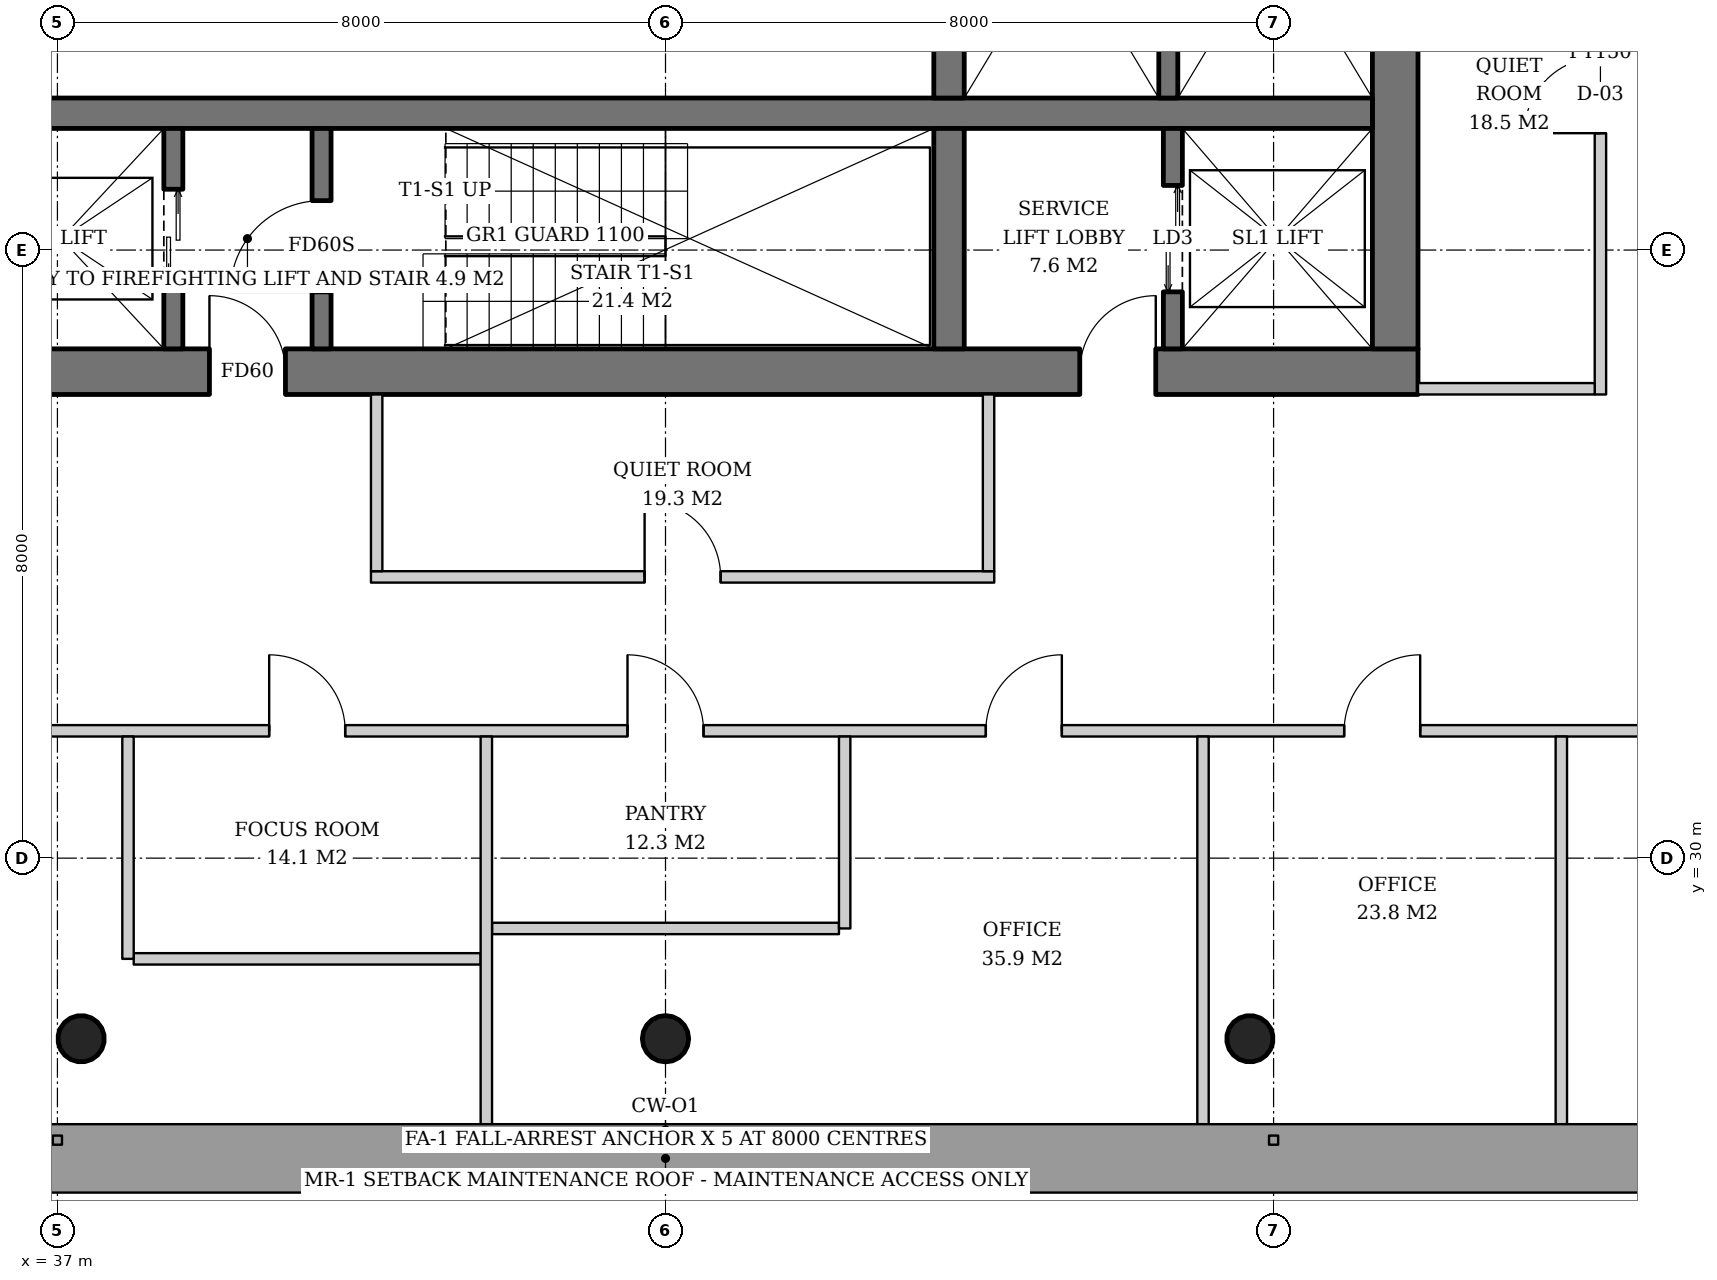
"""IFC4 building model, lengths in metres.
Left out: names, types, materials, properties, quantities, classifications, styles, units other than length and angle.
Written with IfcOpenShell. Run it as: python <this file> out.ifc"""

import sys

from ifc_helpers import new_model, si_unit, direction, frame, frame_2d, origin, origin_2d, place, context, subcontext, project, spatial, rectangle, hollow_circle, extrude, element, fill, save


model = new_model("IFC4")
c1 = context("Model", 3, precision=1e-05, world=origin(), true_north=direction((0.0, 1.0)))
c2 = subcontext(c1, "Body", "Model", "MODEL_VIEW")
j1 = project(units=[si_unit("LENGTHUNIT", "METRE"), si_unit("PLANEANGLEUNIT", "RADIAN")], contexts=[c1])
p1 = place(None, origin())
s1 = spatial("IfcSite", under=j1, at=p1, CompositionType="ELEMENT")
p2 = place(p1, origin())
s2 = spatial("IfcBuilding", under=s1, at=p2, CompositionType="ELEMENT")
p3 = place(p2, frame((0.0, 0.0, 195.8)))
s3 = spatial("IfcBuildingStorey", under=s2, at=p3, CompositionType="ELEMENT", Elevation=195.8)
p4 = place(p3, frame((59.314, 31.686, 0.0), z_axis=(-0.031898107953, 0.031898107953, 0.998981992539), x_axis=(-0.707106781187, -0.707106781187, 0.0)))
e1 = element("IfcColumn", 1, at=p4, inside=s3, PredefinedType="COLUMN", context=c2, shape_type="SweptSolid", body=[
    extrude(rectangle(XDim=2.0, YDim=2.0, at=origin_2d()), origin(), (0.0, 0.0, 1.0), 3.804),
])
p5 = place(p3, frame((37.293, 27.586, 0.0), z_axis=(0.015923048203, 0.031910302246, 0.999363892257), x_axis=(-0.894786976326, 0.446493300058, 0.0)))
e2 = element("IfcColumn", 2, at=p5, inside=s3, PredefinedType="COLUMN", context=c2, shape_type="SweptSolid", body=[
    extrude(hollow_circle(Radius=0.305, WallThickness=0.025, at=origin_2d()), origin(), (0.0, 0.0, 1.0), 3.802),
])
p6 = place(p3, frame((45.0, 27.586, 0.0), z_axis=(0.0, 0.031914348339, 0.999490607445), x_axis=(-1.0, 0.0, 0.0)))
e3 = element("IfcColumn", 3, at=p6, inside=s3, PredefinedType="COLUMN", context=c2, shape_type="SweptSolid", body=[
    extrude(hollow_circle(Radius=0.305, WallThickness=0.025, at=origin_2d()), origin(), (0.0, 0.0, 1.0), 3.802),
])
p7 = place(p3, frame((52.707, 27.586, 0.0), z_axis=(-0.015923048203, 0.031910302246, 0.999363892257), x_axis=(-0.894786976326, -0.446493300058, 0.0)))
e4 = element("IfcColumn", 4, at=p7, inside=s3, PredefinedType="COLUMN", context=c2, shape_type="SweptSolid", body=[
    extrude(hollow_circle(Radius=0.305, WallThickness=0.025, at=origin_2d()), origin(), (0.0, 0.0, 1.0), 3.802),
])
p8 = place(p3, frame((35.1, 36.4, 0.0), z_axis=(0.0, 0.0, 1.0), x_axis=(1.0, 0.0, 0.0)))
e5 = element("IfcWall", 5, at=p8, inside=s3, PredefinedType="SHEAR", context=c2, shape_type="SweptSolid", body=[
    extrude(rectangle(XDim=19.8, YDim=0.6, at=frame_2d((9.9, 0.0))), origin(), (0.0, 0.0, 1.0), 3.8),
])
p9 = place(p8, frame((3.9, 0.0, 0.0)))
e6 = element("IfcOpeningElement", 6, at=p9, cuts=e5, PredefinedType="OPENING", context=c2, shape_type="SweptSolid", body=[
    extrude(rectangle(XDim=1.0, YDim=2.1, at=frame_2d((0.5, 1.05))), frame((0.0, 0.31, 0.0), z_axis=(0.0, -1.0, 0.0), x_axis=(1.0, 0.0, 0.0)), (0.0, 0.0, 1.0), 0.62),
])
p10 = place(p8, frame((15.35, 0.0, 0.0)))
e7 = element("IfcOpeningElement", 7, at=p10, cuts=e5, PredefinedType="OPENING", context=c2, shape_type="SweptSolid", body=[
    extrude(rectangle(XDim=1.0, YDim=2.1, at=frame_2d((0.5, 1.05))), frame((0.0, 0.31, 0.0), z_axis=(0.0, -1.0, 0.0), x_axis=(1.0, 0.0, 0.0)), (0.0, 0.0, 1.0), 0.62),
])
p11 = place(p3, frame((54.6, 36.7, 0.0), z_axis=(0.0, 0.0, 1.0), x_axis=(0.0, 1.0, 0.0)))
e8 = element("IfcWall", 8, at=p11, inside=s3, PredefinedType="SHEAR", context=c2, shape_type="SweptSolid", body=[
    extrude(rectangle(XDim=18.6, YDim=0.6, at=frame_2d((9.3, 0.0))), origin(), (0.0, 0.0, 1.0), 3.8),
])
p12 = place(p11, frame((8.4, 0.0, 0.0)))
e9 = element("IfcOpeningElement", 9, at=p12, cuts=e8, PredefinedType="OPENING", context=c2, shape_type="SweptSolid", body=[
    extrude(rectangle(XDim=1.8, YDim=2.4, at=frame_2d((0.9, 1.2))), frame((0.0, 0.31, 0.0), z_axis=(0.0, -1.0, 0.0), x_axis=(1.0, 0.0, 0.0)), (0.0, 0.0, 1.0), 0.62),
])
p13 = place(p3, frame((35.7, 39.8, 0.0), z_axis=(0.0, 0.0, 1.0), x_axis=(1.0, 0.0, 0.0)))
e10 = element("IfcWall", 10, at=p13, inside=s3, PredefinedType="SHEAR", context=c2, shape_type="SweptSolid", body=[
    extrude(rectangle(XDim=18.6, YDim=0.4, at=frame_2d((9.3, 0.0))), origin(), (0.0, 0.0, 1.0), 3.8),
])
p14 = place(p3, frame((48.73, 36.7, 0.0), z_axis=(0.0, 0.0, 1.0), x_axis=(0.0, 1.0, 0.0)))
e11 = element("IfcWall", 11, at=p14, inside=s3, PredefinedType="SHEAR", context=c2, shape_type="SweptSolid", body=[
    extrude(rectangle(XDim=2.9, YDim=0.4, at=frame_2d((1.45, 0.0))), origin(), (0.0, 0.0, 1.0), 3.8),
])
p15 = place(p3, frame((48.73, 40.0, 0.0), z_axis=(0.0, 0.0, 1.0), x_axis=(0.0, 1.0, 0.0)))
e12 = element("IfcWall", 12, at=p15, inside=s3, PredefinedType="SHEAR", context=c2, shape_type="SweptSolid", body=[
    extrude(rectangle(XDim=12.0, YDim=0.4, at=frame_2d((6.0, 0.0))), origin(), (0.0, 0.0, 1.0), 3.8),
])
p16 = place(p3, frame((38.525, 36.7, 0.0), z_axis=(0.0, 0.0, 1.0), x_axis=(0.0, 1.0, 0.0)))
e13 = element("IfcWall", 13, at=p16, inside=s3, PredefinedType="SHEAR", context=c2, shape_type="SweptSolid", body=[
    extrude(rectangle(XDim=2.9, YDim=0.25, at=frame_2d((1.45, 0.0))), origin(), (0.0, 0.0, 1.0), 3.8),
])
p17 = place(p16, frame((0.8, 0.0, 0.0)))
e14 = element("IfcOpeningElement", 14, at=p17, cuts=e13, PredefinedType="OPENING", context=c2, shape_type="SweptSolid", body=[
    extrude(rectangle(XDim=1.3, YDim=2.2, at=frame_2d((0.65, 1.1))), frame((0.0, 0.135, 0.0), z_axis=(0.0, -1.0, 0.0), x_axis=(1.0, 0.0, 0.0)), (0.0, 0.0, 1.0), 0.27),
])
p18 = place(p3, frame((40.475, 36.7, 0.0), z_axis=(0.0, 0.0, 1.0), x_axis=(0.0, 1.0, 0.0)))
e15 = element("IfcWall", 15, at=p18, inside=s3, PredefinedType="SHEAR", context=c2, shape_type="SweptSolid", body=[
    extrude(rectangle(XDim=2.9, YDim=0.25, at=frame_2d((1.45, 0.0))), origin(), (0.0, 0.0, 1.0), 3.8),
])
p19 = place(p18, frame((0.75, 0.0, 0.0)))
e16 = element("IfcOpeningElement", 16, at=p19, cuts=e15, PredefinedType="OPENING", context=c2, shape_type="SweptSolid", body=[
    extrude(rectangle(XDim=1.2, YDim=2.1, at=frame_2d((0.6, 1.05))), frame((0.0, 0.135, 0.0), z_axis=(0.0, -1.0, 0.0), x_axis=(1.0, 0.0, 0.0)), (0.0, 0.0, 1.0), 0.27),
])
p20 = place(p3, frame((51.675, 36.7, 0.0), z_axis=(0.0, 0.0, 1.0), x_axis=(0.0, 1.0, 0.0)))
e17 = element("IfcWall", 17, at=p20, inside=s3, PredefinedType="SHEAR", context=c2, shape_type="SweptSolid", body=[
    extrude(rectangle(XDim=2.9, YDim=0.25, at=frame_2d((1.45, 0.0))), origin(), (0.0, 0.0, 1.0), 3.8),
])
p21 = place(p20, frame((0.75, 0.0, 0.0)))
e18 = element("IfcOpeningElement", 18, at=p21, cuts=e17, PredefinedType="OPENING", context=c2, shape_type="SweptSolid", body=[
    extrude(rectangle(XDim=1.4, YDim=2.4, at=frame_2d((0.7, 1.2))), frame((0.0, 0.135, 0.0), z_axis=(0.0, -1.0, 0.0), x_axis=(1.0, 0.0, 0.0)), (0.0, 0.0, 1.0), 0.27),
])
p22 = place(p3, frame((51.615, 44.25, 0.0), z_axis=(0.0, 0.0, 1.0), x_axis=(0.0, -1.0, 0.0)))
e19 = element("IfcWall", 19, at=p22, inside=s3, PredefinedType="SHEAR", context=c2, shape_type="SweptSolid", body=[
    extrude(rectangle(XDim=4.25, YDim=0.25, at=frame_2d((2.125, 0.0))), origin(), (0.0, 0.0, 1.0), 3.8),
])
p23 = place(p3, frame((57.3, 36.1, 0.0), z_axis=(0.0, 0.0, 1.0), x_axis=(0.0, 1.0, 0.0)))
e20 = element("IfcWall", 20, at=p23, inside=s3, PredefinedType="PARTITIONING", context=c2, shape_type="SweptSolid", body=[
    extrude(rectangle(XDim=7.875, YDim=0.15, at=frame_2d((3.938, 0.0))), origin(), (0.0, 0.0, 1.0), 2.867),
])
p24 = place(p23, frame((3.438, 0.0, 0.0)))
e21 = element("IfcOpeningElement", 21, at=p24, cuts=e20, PredefinedType="OPENING", context=c2, shape_type="SweptSolid", body=[
    extrude(rectangle(XDim=1.0, YDim=2.1, at=frame_2d((0.5, 1.05))), frame((0.0, 0.085, 0.0), z_axis=(0.0, -1.0, 0.0), x_axis=(1.0, 0.0, 0.0)), (0.0, 0.0, 1.0), 0.17),
])
p25 = place(p3, frame((54.9, 36.175, 0.0), z_axis=(0.0, 0.0, 1.0), x_axis=(1.0, 0.0, 0.0)))
e22 = element("IfcWall", 22, at=p25, inside=s3, PredefinedType="PARTITIONING", context=c2, shape_type="SweptSolid", body=[
    extrude(rectangle(XDim=2.325, YDim=0.15, at=frame_2d((1.163, 0.0))), origin(), (0.0, 0.0, 1.0), 2.867),
])
p26 = place(p3, frame((41.125, 33.7, 0.0), z_axis=(0.0, 0.0, 1.0), x_axis=(1.0, 0.0, 0.0)))
e23 = element("IfcWall", 23, at=p26, inside=s3, PredefinedType="PARTITIONING", context=c2, shape_type="SweptSolid", body=[
    extrude(rectangle(XDim=8.2, YDim=0.15, at=frame_2d((4.1, 0.0))), origin(), (0.0, 0.0, 1.0), 2.867),
])
p27 = place(p26, frame((3.6, 0.0, 0.0)))
e24 = element("IfcOpeningElement", 24, at=p27, cuts=e23, PredefinedType="OPENING", context=c2, shape_type="SweptSolid", body=[
    extrude(rectangle(XDim=1.0, YDim=2.1, at=frame_2d((0.5, 1.05))), frame((0.0, 0.085, 0.0), z_axis=(0.0, -1.0, 0.0), x_axis=(1.0, 0.0, 0.0)), (0.0, 0.0, 1.0), 0.17),
])
for number, where, z_axis, x_axis in (
    (25, (41.2, 36.1, 0.0), (0.0, 0.0, 1.0), (0.0, -1.0, 0.0)),
    (26, (49.25, 36.1, 0.0), (0.0, 0.0, 1.0), (0.0, -1.0, 0.0)),
):
    element("IfcWall", number, at=place(p3, frame(where, z_axis=z_axis, x_axis=x_axis)), inside=s3, PredefinedType="PARTITIONING", context=c2, shape_type="SweptSolid", body=[
        extrude(rectangle(XDim=2.325, YDim=0.15, at=frame_2d((1.163, 0.0))), origin(), (0.0, 0.0, 1.0), 3.62),
    ])
p28 = place(p3, frame((38.004, 28.675, 0.0), z_axis=(0.0, 0.0, 1.0), x_axis=(1.0, 0.0, 0.0)))
e27 = element("IfcWall", 27, at=p28, inside=s3, PredefinedType="PARTITIONING", context=c2, shape_type="SweptSolid", body=[
    extrude(rectangle(XDim=4.564, YDim=0.15, at=frame_2d((2.282, 0.0))), origin(), (0.0, 0.0, 1.0), 2.867),
])
p29 = place(p3, frame((42.718, 29.075, 0.0), z_axis=(0.0, 0.0, 1.0), x_axis=(1.0, 0.0, 0.0)))
e28 = element("IfcWall", 28, at=p29, inside=s3, PredefinedType="PARTITIONING", context=c2, shape_type="SweptSolid", body=[
    extrude(rectangle(XDim=4.564, YDim=0.15, at=frame_2d((2.282, 0.0))), origin(), (0.0, 0.0, 1.0), 2.867),
])
p30 = place(p3, frame((32.164, 31.675, 0.0), z_axis=(0.0, 0.0, 1.0), x_axis=(1.0, 0.0, 0.0)))
e29 = element("IfcWall", 29, at=p30, inside=s3, PredefinedType="PARTITIONING", context=c2, shape_type="SweptSolid", body=[
    extrude(rectangle(XDim=25.671, YDim=0.15, at=frame_2d((12.836, 0.0))), origin(), (0.0, 0.0, 1.0), 2.867),
])
p31 = place(p30, frame((2.907, 0.0, 0.0)))
e30 = element("IfcOpeningElement", 30, at=p31, cuts=e29, PredefinedType="OPENING", context=c2, shape_type="SweptSolid", body=[
    extrude(rectangle(XDim=1.0, YDim=2.1, at=frame_2d((0.5, 1.05))), frame((0.0, 0.085, 0.0), z_axis=(0.0, -1.0, 0.0), x_axis=(1.0, 0.0, 0.0)), (0.0, 0.0, 1.0), 0.17),
])
p32 = place(p30, frame((7.622, 0.0, 0.0)))
e31 = element("IfcOpeningElement", 31, at=p32, cuts=e29, PredefinedType="OPENING", context=c2, shape_type="SweptSolid", body=[
    extrude(rectangle(XDim=1.0, YDim=2.1, at=frame_2d((0.5, 1.05))), frame((0.0, 0.085, 0.0), z_axis=(0.0, -1.0, 0.0), x_axis=(1.0, 0.0, 0.0)), (0.0, 0.0, 1.0), 0.17),
])
p33 = place(p30, frame((12.336, 0.0, 0.0)))
e32 = element("IfcOpeningElement", 32, at=p33, cuts=e29, PredefinedType="OPENING", context=c2, shape_type="SweptSolid", body=[
    extrude(rectangle(XDim=1.0, YDim=2.1, at=frame_2d((0.5, 1.05))), frame((0.0, 0.085, 0.0), z_axis=(0.0, -1.0, 0.0), x_axis=(1.0, 0.0, 0.0)), (0.0, 0.0, 1.0), 0.17),
])
p34 = place(p30, frame((17.05, 0.0, 0.0)))
e33 = element("IfcOpeningElement", 33, at=p34, cuts=e29, PredefinedType="OPENING", context=c2, shape_type="SweptSolid", body=[
    extrude(rectangle(XDim=1.0, YDim=2.1, at=frame_2d((0.5, 1.05))), frame((0.0, 0.085, 0.0), z_axis=(0.0, -1.0, 0.0), x_axis=(1.0, 0.0, 0.0)), (0.0, 0.0, 1.0), 0.17),
])
p35 = place(p30, frame((21.764, 0.0, 0.0)))
e34 = element("IfcOpeningElement", 34, at=p35, cuts=e29, PredefinedType="OPENING", context=c2, shape_type="SweptSolid", body=[
    extrude(rectangle(XDim=1.0, YDim=2.1, at=frame_2d((0.5, 1.05))), frame((0.0, 0.085, 0.0), z_axis=(0.0, -1.0, 0.0), x_axis=(1.0, 0.0, 0.0)), (0.0, 0.0, 1.0), 0.17),
])
p36 = place(p3, frame((37.928, 31.6, 0.0), z_axis=(0.0, 0.0, 1.0), x_axis=(0.0, -1.0, 0.0)))
e35 = element("IfcWall", 35, at=p36, inside=s3, PredefinedType="PARTITIONING", context=c2, shape_type="SweptSolid", body=[
    extrude(rectangle(XDim=2.925, YDim=0.15, at=frame_2d((1.462, 0.0))), origin(), (0.0, 0.0, 1.0), 3.62),
])
p37 = place(p3, frame((42.643, 31.6, 0.0), z_axis=(0.0, 0.0, 1.0), x_axis=(0.0, -1.0, 0.0)))
e36 = element("IfcWall", 36, at=p37, inside=s3, PredefinedType="PARTITIONING", context=c2, shape_type="SweptSolid", body=[
    extrude(rectangle(XDim=5.14, YDim=0.15, at=frame_2d((2.57, 0.0))), origin(), (0.0, 0.0, 1.0), 3.12),
])
p38 = place(p3, frame((47.357, 31.6, 0.0), z_axis=(0.0, 0.0, 1.0), x_axis=(0.0, -1.0, 0.0)))
e37 = element("IfcWall", 37, at=p38, inside=s3, PredefinedType="PARTITIONING", context=c2, shape_type="SweptSolid", body=[
    extrude(rectangle(XDim=2.525, YDim=0.15, at=frame_2d((1.263, 0.0))), origin(), (0.0, 0.0, 1.0), 2.867),
])
for number, where, z_axis, x_axis in (
    (38, (52.072, 31.6, 0.0), (0.0, 0.0, 1.0), (0.0, -1.0, 0.0)),
    (39, (56.786, 31.6, 0.0), (0.0, 0.0, 1.0), (0.0, -1.0, 0.0)),
):
    element("IfcWall", number, at=place(p3, frame(where, z_axis=z_axis, x_axis=x_axis)), inside=s3, PredefinedType="PARTITIONING", context=c2, shape_type="SweptSolid", body=[
        extrude(rectangle(XDim=5.14, YDim=0.15, at=frame_2d((2.57, 0.0))), origin(), (0.0, 0.0, 1.0), 3.12),
    ])
p39 = place(p17, origin())
e40 = element("IfcDoor", 40, at=p39, inside=s3, OperationType="DOUBLE_DOOR_SLIDING", PredefinedType="DOOR", context=c2, shape_type="SweptSolid", body=[
    extrude(rectangle(XDim=1.3, YDim=2.2, at=frame_2d((0.65, 1.1))), frame((0.0, 0.025, 0.0), z_axis=(0.0, -1.0, 0.0), x_axis=(1.0, 0.0, 0.0)), (0.0, 0.0, 1.0), 0.05),
])
fill(e14, e40)
p40 = place(p19, origin())
e41 = element("IfcDoor", 41, at=p40, inside=s3, OperationType="SINGLE_SWING_LEFT", PredefinedType="DOOR", context=c2, shape_type="SweptSolid", body=[
    extrude(rectangle(XDim=1.2, YDim=2.1, at=frame_2d((0.6, 1.05))), frame((0.0, 0.025, 0.0), z_axis=(0.0, -1.0, 0.0), x_axis=(1.0, 0.0, 0.0)), (0.0, 0.0, 1.0), 0.05),
])
fill(e16, e41)
p41 = place(p21, origin())
e42 = element("IfcDoor", 42, at=p41, inside=s3, OperationType="DOUBLE_DOOR_SLIDING", PredefinedType="DOOR", context=c2, shape_type="SweptSolid", body=[
    extrude(rectangle(XDim=1.4, YDim=2.4, at=frame_2d((0.7, 1.2))), frame((0.0, 0.025, 0.0), z_axis=(0.0, -1.0, 0.0), x_axis=(1.0, 0.0, 0.0)), (0.0, 0.0, 1.0), 0.05),
])
fill(e18, e42)
p42 = place(p9, origin())
e43 = element("IfcDoor", 43, at=p42, inside=s3, OperationType="SINGLE_SWING_LEFT", PredefinedType="DOOR", context=c2, shape_type="SweptSolid", body=[
    extrude(rectangle(XDim=1.0, YDim=2.1, at=frame_2d((0.5, 1.05))), frame((0.0, 0.025, 0.0), z_axis=(0.0, -1.0, 0.0), x_axis=(1.0, 0.0, 0.0)), (0.0, 0.0, 1.0), 0.05),
])
fill(e6, e43)
p43 = place(p10, origin())
e44 = element("IfcDoor", 44, at=p43, inside=s3, OperationType="SINGLE_SWING_RIGHT", PredefinedType="DOOR", context=c2, shape_type="SweptSolid", body=[
    extrude(rectangle(XDim=1.0, YDim=2.1, at=frame_2d((0.5, 1.05))), frame((0.0, 0.025, 0.0), z_axis=(0.0, -1.0, 0.0), x_axis=(1.0, 0.0, 0.0)), (0.0, 0.0, 1.0), 0.05),
])
fill(e7, e44)
p44 = place(p24, origin())
e45 = element("IfcDoor", 45, at=p44, inside=s3, OperationType="SINGLE_SWING_LEFT", PredefinedType="DOOR", context=c2, shape_type="SweptSolid", body=[
    extrude(rectangle(XDim=1.0, YDim=2.1, at=frame_2d((0.5, 1.05))), frame((0.0, 0.025, 0.0), z_axis=(0.0, -1.0, 0.0), x_axis=(1.0, 0.0, 0.0)), (0.0, 0.0, 1.0), 0.05),
])
fill(e21, e45)
p45 = place(p27, origin())
e46 = element("IfcDoor", 46, at=p45, inside=s3, OperationType="SINGLE_SWING_LEFT", PredefinedType="DOOR", context=c2, shape_type="SweptSolid", body=[
    extrude(rectangle(XDim=1.0, YDim=2.1, at=frame_2d((0.5, 1.05))), frame((0.0, 0.025, 0.0), z_axis=(0.0, -1.0, 0.0), x_axis=(1.0, 0.0, 0.0)), (0.0, 0.0, 1.0), 0.05),
])
fill(e24, e46)
p46 = place(p32, origin())
e47 = element("IfcDoor", 47, at=p46, inside=s3, OperationType="SINGLE_SWING_LEFT", PredefinedType="DOOR", context=c2, shape_type="SweptSolid", body=[
    extrude(rectangle(XDim=1.0, YDim=2.1, at=frame_2d((0.5, 1.05))), frame((0.0, 0.025, 0.0), z_axis=(0.0, -1.0, 0.0), x_axis=(1.0, 0.0, 0.0)), (0.0, 0.0, 1.0), 0.05),
])
fill(e31, e47)
p47 = place(p33, origin())
e48 = element("IfcDoor", 48, at=p47, inside=s3, OperationType="SINGLE_SWING_LEFT", PredefinedType="DOOR", context=c2, shape_type="SweptSolid", body=[
    extrude(rectangle(XDim=1.0, YDim=2.1, at=frame_2d((0.5, 1.05))), frame((0.0, 0.025, 0.0), z_axis=(0.0, -1.0, 0.0), x_axis=(1.0, 0.0, 0.0)), (0.0, 0.0, 1.0), 0.05),
])
fill(e32, e48)
p48 = place(p34, origin())
e49 = element("IfcDoor", 49, at=p48, inside=s3, OperationType="SINGLE_SWING_RIGHT", PredefinedType="DOOR", context=c2, shape_type="SweptSolid", body=[
    extrude(rectangle(XDim=1.0, YDim=2.1, at=frame_2d((0.5, 1.05))), frame((0.0, 0.025, 0.0), z_axis=(0.0, -1.0, 0.0), x_axis=(1.0, 0.0, 0.0)), (0.0, 0.0, 1.0), 0.05),
])
fill(e33, e49)
p49 = place(p35, origin())
e50 = element("IfcDoor", 50, at=p49, inside=s3, OperationType="SINGLE_SWING_RIGHT", PredefinedType="DOOR", context=c2, shape_type="SweptSolid", body=[
    extrude(rectangle(XDim=1.0, YDim=2.1, at=frame_2d((0.5, 1.05))), frame((0.0, 0.025, 0.0), z_axis=(0.0, -1.0, 0.0), x_axis=(1.0, 0.0, 0.0)), (0.0, 0.0, 1.0), 0.05),
])
fill(e34, e50)
save(model, sys.argv[1])
